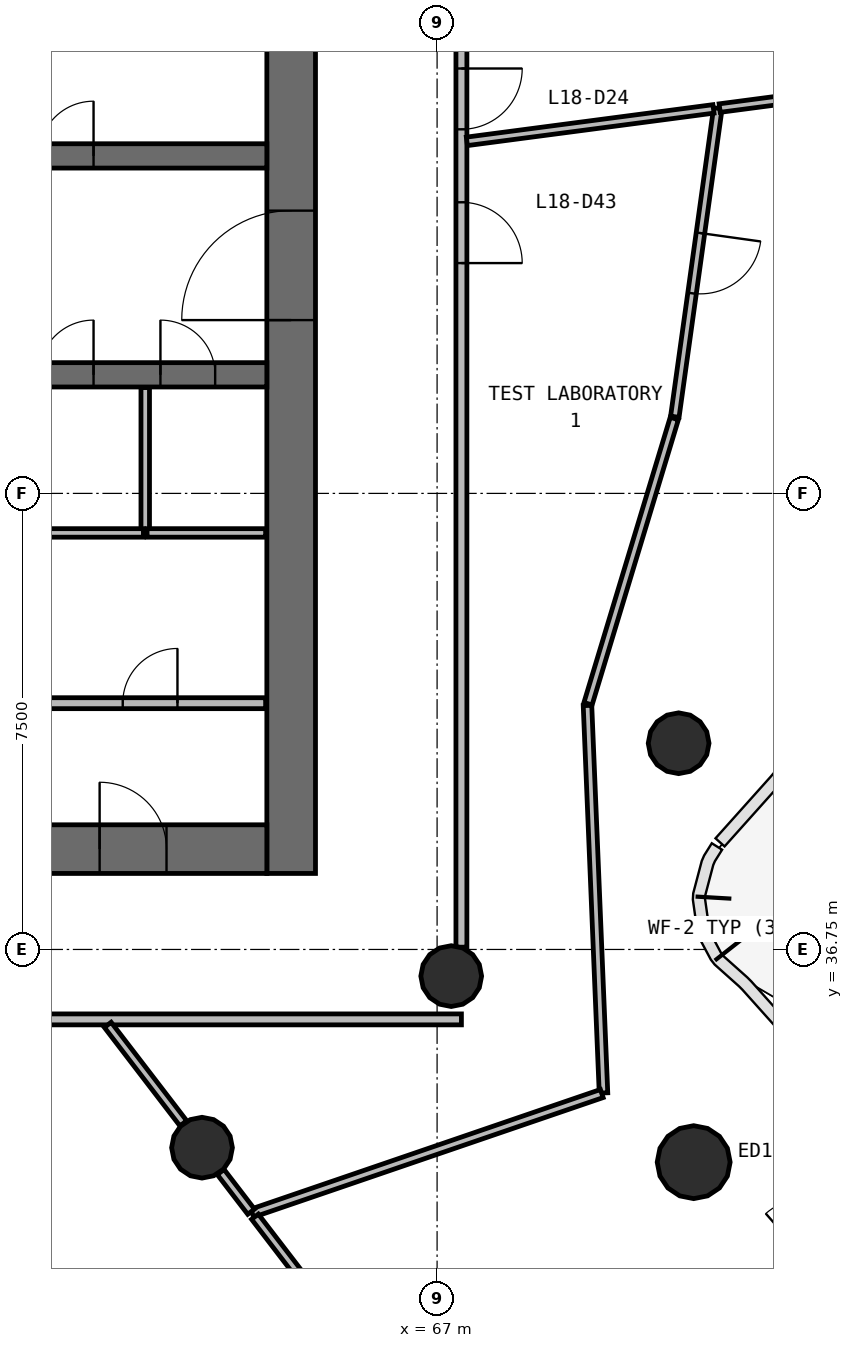
"""IFC4 building model, lengths in metres.
Left out: names, types, materials, properties, quantities, classifications, styles, units other than length and angle.
Written with IfcOpenShell. Run it as: python <this file> out.ifc"""

import sys

from ifc_helpers import new_model, si_unit, direction, frame, frame_2d, origin, origin_2d, place, context, subcontext, project, spatial, rectangle, circle, extrude, source, transform, mapped, element, fill, save


model = new_model("IFC4")
c1 = context("Model", 3, precision=1e-05, world=origin(), true_north=direction((0.0, 1.0)))
c2 = subcontext(c1, "Body", "Model", "MODEL_VIEW")
j1 = project(units=[si_unit("LENGTHUNIT", "METRE"), si_unit("PLANEANGLEUNIT", "RADIAN")], contexts=[c1])
p1 = place(None, origin())
s1 = spatial("IfcSite", under=j1, at=p1, CompositionType="ELEMENT")
p2 = place(p1, origin())
s2 = spatial("IfcBuilding", under=s1, at=p2, CompositionType="ELEMENT")
p3 = place(p2, frame((0.0, 0.0, 79.8)))
s3 = spatial("IfcBuildingStorey", under=s2, at=p3, CompositionType="ELEMENT", Elevation=79.8)
p4 = place(p3, frame((64.6, 38.0, 0.0), z_axis=(0.0, 0.0, 1.0), x_axis=(0.0, 1.0, 0.0)))
e1 = element("IfcWall", 1, at=p4, inside=s3, PredefinedType="SHEAR", context=c2, shape_type="SweptSolid", body=[
    extrude(rectangle(XDim=20.0, YDim=0.8, at=frame_2d((10.0, 0.0))), origin(), (0.0, 0.0, 1.0), 4.1),
])
p5 = place(p4, frame((9.1, 0.0, 0.0)))
e2 = element("IfcOpeningElement", 2, at=p5, cuts=e1, PredefinedType="OPENING", context=c2, shape_type="SweptSolid", body=[
    extrude(rectangle(XDim=1.8, YDim=2.1, at=frame_2d((0.9, 1.05))), frame((0.0, 0.41, 0.0), z_axis=(0.0, -1.0, 0.0), x_axis=(1.0, 0.0, 0.0)), (0.0, 0.0, 1.0), 0.82),
])
p6 = place(p3, frame((39.8, 38.4, 0.0), z_axis=(0.0, 0.0, 1.0), x_axis=(1.0, 0.0, 0.0)))
e3 = element("IfcWall", 3, at=p6, inside=s3, PredefinedType="SHEAR", context=c2, shape_type="SweptSolid", body=[
    extrude(rectangle(XDim=24.4, YDim=0.8, at=frame_2d((12.2, 0.0))), origin(), (0.0, 0.0, 1.0), 4.1),
])
p7 = place(p6, frame((21.65, 0.0, 0.0)))
e4 = element("IfcOpeningElement", 4, at=p7, cuts=e3, PredefinedType="OPENING", context=c2, shape_type="SweptSolid", body=[
    extrude(rectangle(XDim=1.1, YDim=2.1, at=frame_2d((0.55, 1.05))), frame((0.0, 0.41, 0.0), z_axis=(0.0, -1.0, 0.0), x_axis=(1.0, 0.0, 0.0)), (0.0, 0.0, 1.0), 0.82),
])
p8 = place(p6, frame((2.15, 0.0, 0.0)))
e5 = element("IfcOpeningElement", 5, at=p8, cuts=e3, PredefinedType="OPENING", context=c2, shape_type="SweptSolid", body=[
    extrude(rectangle(XDim=1.1, YDim=2.1, at=frame_2d((0.55, 1.05))), frame((0.0, 0.41, 0.0), z_axis=(0.0, -1.0, 0.0), x_axis=(1.0, 0.0, 0.0)), (0.0, 0.0, 1.0), 0.82),
])
p9 = place(p3, frame((39.8, 49.8, 0.0), z_axis=(0.0, 0.0, 1.0), x_axis=(1.0, 0.0, 0.0)))
e6 = element("IfcWall", 6, at=p9, inside=s3, PredefinedType="SHEAR", context=c2, shape_type="SweptSolid", body=[
    extrude(rectangle(XDim=24.4, YDim=0.4, at=frame_2d((12.2, 0.0))), origin(), (0.0, 0.0, 1.0), 4.1),
])
p10 = place(p9, frame((4.7, 0.0, 0.0)))
e7 = element("IfcOpeningElement", 7, at=p10, cuts=e6, PredefinedType="OPENING", context=c2, shape_type="SweptSolid", body=[
    extrude(rectangle(XDim=1.1, YDim=2.1, at=frame_2d((0.55, 1.05))), frame((0.0, 0.21, 0.0), z_axis=(0.0, -1.0, 0.0), x_axis=(1.0, 0.0, 0.0)), (0.0, 0.0, 1.0), 0.42),
])
p11 = place(p9, frame((7.2, 0.0, 0.0)))
e8 = element("IfcOpeningElement", 8, at=p11, cuts=e6, PredefinedType="OPENING", context=c2, shape_type="SweptSolid", body=[
    extrude(rectangle(XDim=1.1, YDim=2.1, at=frame_2d((0.55, 1.05))), frame((0.0, 0.21, 0.0), z_axis=(0.0, -1.0, 0.0), x_axis=(1.0, 0.0, 0.0)), (0.0, 0.0, 1.0), 0.42),
])
p12 = place(p9, frame((9.7, 0.0, 0.0)))
e9 = element("IfcOpeningElement", 9, at=p12, cuts=e6, PredefinedType="OPENING", context=c2, shape_type="SweptSolid", body=[
    extrude(rectangle(XDim=1.1, YDim=2.1, at=frame_2d((0.55, 1.05))), frame((0.0, 0.21, 0.0), z_axis=(0.0, -1.0, 0.0), x_axis=(1.0, 0.0, 0.0)), (0.0, 0.0, 1.0), 0.42),
])
p13 = place(p9, frame((1.1, 0.0, 0.0)))
e10 = element("IfcOpeningElement", 10, at=p13, cuts=e6, PredefinedType="OPENING", context=c2, shape_type="SweptSolid", body=[
    extrude(rectangle(XDim=1.8, YDim=2.4, at=frame_2d((0.9, 1.2))), frame((0.0, 0.21, 0.0), z_axis=(0.0, -1.0, 0.0), x_axis=(1.0, 0.0, 0.0)), (0.0, 0.0, 1.0), 0.42),
])
p14 = place(p9, frame((20.65, 0.0, 0.0)))
e11 = element("IfcOpeningElement", 11, at=p14, cuts=e6, PredefinedType="OPENING", context=c2, shape_type="SweptSolid", body=[
    extrude(rectangle(XDim=0.9, YDim=2.1, at=frame_2d((0.45, 1.05))), frame((0.0, 0.21, 0.0), z_axis=(0.0, -1.0, 0.0), x_axis=(1.0, 0.0, 0.0)), (0.0, 0.0, 1.0), 0.42),
])
p15 = place(p9, frame((11.85, 0.0, 0.0)))
e12 = element("IfcOpeningElement", 12, at=p15, cuts=e6, PredefinedType="OPENING", context=c2, shape_type="SweptSolid", body=[
    extrude(rectangle(XDim=0.9, YDim=2.1, at=frame_2d((0.45, 1.05))), frame((0.0, 0.21, 0.0), z_axis=(0.0, -1.0, 0.0), x_axis=(1.0, 0.0, 0.0)), (0.0, 0.0, 1.0), 0.42),
])
p16 = place(p3, frame((39.8, 46.2, 0.0), z_axis=(0.0, 0.0, 1.0), x_axis=(1.0, 0.0, 0.0)))
e13 = element("IfcWall", 13, at=p16, inside=s3, PredefinedType="SHEAR", context=c2, shape_type="SweptSolid", body=[
    extrude(rectangle(XDim=24.4, YDim=0.4, at=frame_2d((12.2, 0.0))), origin(), (0.0, 0.0, 1.0), 4.1),
])
p17 = place(p16, frame((4.7, 0.0, 0.0)))
e14 = element("IfcOpeningElement", 14, at=p17, cuts=e13, PredefinedType="OPENING", context=c2, shape_type="SweptSolid", body=[
    extrude(rectangle(XDim=1.1, YDim=2.1, at=frame_2d((0.55, 1.05))), frame((0.0, 0.21, 0.0), z_axis=(0.0, -1.0, 0.0), x_axis=(1.0, 0.0, 0.0)), (0.0, 0.0, 1.0), 0.42),
])
p18 = place(p16, frame((7.2, 0.0, 0.0)))
e15 = element("IfcOpeningElement", 15, at=p18, cuts=e13, PredefinedType="OPENING", context=c2, shape_type="SweptSolid", body=[
    extrude(rectangle(XDim=1.1, YDim=2.1, at=frame_2d((0.55, 1.05))), frame((0.0, 0.21, 0.0), z_axis=(0.0, -1.0, 0.0), x_axis=(1.0, 0.0, 0.0)), (0.0, 0.0, 1.0), 0.42),
])
p19 = place(p16, frame((9.7, 0.0, 0.0)))
e16 = element("IfcOpeningElement", 16, at=p19, cuts=e13, PredefinedType="OPENING", context=c2, shape_type="SweptSolid", body=[
    extrude(rectangle(XDim=1.1, YDim=2.1, at=frame_2d((0.55, 1.05))), frame((0.0, 0.21, 0.0), z_axis=(0.0, -1.0, 0.0), x_axis=(1.0, 0.0, 0.0)), (0.0, 0.0, 1.0), 0.42),
])
p20 = place(p16, frame((20.65, 0.0, 0.0)))
e17 = element("IfcOpeningElement", 17, at=p20, cuts=e13, PredefinedType="OPENING", context=c2, shape_type="SweptSolid", body=[
    extrude(rectangle(XDim=0.9, YDim=2.1, at=frame_2d((0.45, 1.05))), frame((0.0, 0.21, 0.0), z_axis=(0.0, -1.0, 0.0), x_axis=(1.0, 0.0, 0.0)), (0.0, 0.0, 1.0), 0.42),
])
p21 = place(p16, frame((22.65, 0.0, 0.0)))
e18 = element("IfcOpeningElement", 18, at=p21, cuts=e13, PredefinedType="OPENING", context=c2, shape_type="SweptSolid", body=[
    extrude(rectangle(XDim=0.9, YDim=2.1, at=frame_2d((0.45, 1.05))), frame((0.0, 0.21, 0.0), z_axis=(0.0, -1.0, 0.0), x_axis=(1.0, 0.0, 0.0)), (0.0, 0.0, 1.0), 0.42),
])
p22 = place(p16, frame((0.85, 0.0, 0.0)))
e19 = element("IfcOpeningElement", 19, at=p22, cuts=e13, PredefinedType="OPENING", context=c2, shape_type="SweptSolid", body=[
    extrude(rectangle(XDim=0.9, YDim=2.1, at=frame_2d((0.45, 1.05))), frame((0.0, 0.21, 0.0), z_axis=(0.0, -1.0, 0.0), x_axis=(1.0, 0.0, 0.0)), (0.0, 0.0, 1.0), 0.42),
])
p23 = place(p16, frame((2.85, 0.0, 0.0)))
e20 = element("IfcOpeningElement", 20, at=p23, cuts=e13, PredefinedType="OPENING", context=c2, shape_type="SweptSolid", body=[
    extrude(rectangle(XDim=0.9, YDim=2.1, at=frame_2d((0.45, 1.05))), frame((0.0, 0.21, 0.0), z_axis=(0.0, -1.0, 0.0), x_axis=(1.0, 0.0, 0.0)), (0.0, 0.0, 1.0), 0.42),
])
p24 = place(p16, frame((11.85, 0.0, 0.0)))
e21 = element("IfcOpeningElement", 21, at=p24, cuts=e13, PredefinedType="OPENING", context=c2, shape_type="SweptSolid", body=[
    extrude(rectangle(XDim=0.9, YDim=2.1, at=frame_2d((0.45, 1.05))), frame((0.0, 0.21, 0.0), z_axis=(0.0, -1.0, 0.0), x_axis=(1.0, 0.0, 0.0)), (0.0, 0.0, 1.0), 0.42),
])
m1 = source(origin(), c2, "Body", "SweptSolid", [
    extrude(circle(Radius=0.6, at=origin_2d()), origin(), (0.0, 0.0, 1.0), 4.5),
])
p25 = place(p3, frame((71.22, 33.252, -0.4), z_axis=(0.0, 0.0, 1.0), x_axis=(1.0, 0.0, 0.0)))
e22 = element("IfcColumn", 22, at=p25, inside=s3, PredefinedType="COLUMN", context=c2, shape_type="MappedRepresentation", body=[
    mapped(m1, transform((0.0, 0.0, 0.0), scale=1.0)),
])
m2 = source(origin(), c2, "Body", "SweptSolid", [
    extrude(circle(Radius=0.5, at=origin_2d()), origin(), (0.0, 0.0, 1.0), 4.1),
])
for number, where, z_axis, x_axis in (
    (23, (63.134, 33.49, 0.0), (0.0, 0.0, 1.0), (1.0, 0.0, 0.0)),
    (24, (67.232, 36.312, 0.0), (0.0, 0.0, 1.0), (1.0, 0.0, 0.0)),
    (25, (70.972, 40.141, 0.0), (0.0, 0.0, 1.0), (1.0, 0.0, 0.0)),
):
    element("IfcColumn", number, at=place(p3, frame(where, z_axis=z_axis, x_axis=x_axis)), inside=s3, PredefinedType="COLUMN", context=c2, shape_type="MappedRepresentation", body=[
        mapped(m2, transform((0.0, 0.0, 0.0), scale=1.0)),
    ])
p26 = place(p3, frame((72.124, 30.835, 0.0), z_axis=(0.0, 0.0, 1.0), x_axis=(0.753580850098, 0.65735523301, 0.0)))
e26 = element("IfcWall", 26, at=p26, inside=s3, PredefinedType="STANDARD", context=c2, shape_type="SweptSolid", body=[
    extrude(rectangle(XDim=3.491, YDim=0.18, at=frame_2d((1.746, 0.0))), origin(), (0.0, 0.0, 1.0), 3.7),
])
p27 = place(p26, frame((1.246, 0.0, 0.0)))
e27 = element("IfcOpeningElement", 27, at=p27, cuts=e26, PredefinedType="OPENING", context=c2, shape_type="SweptSolid", body=[
    extrude(rectangle(XDim=1.0, YDim=2.1, at=frame_2d((0.5, 1.05))), frame((0.0, 0.1, 0.0), z_axis=(0.0, -1.0, 0.0), x_axis=(1.0, 0.0, 0.0)), (0.0, 0.0, 1.0), 0.2),
])
p28 = place(p3, frame((67.4, 35.6, 0.0), z_axis=(0.0, 0.0, 1.0), x_axis=(-1.0, 0.0, 0.0)))
e28 = element("IfcWall", 28, at=p28, inside=s3, PredefinedType="PARTITIONING", context=c2, shape_type="SweptSolid", body=[
    extrude(rectangle(XDim=30.8, YDim=0.18, at=frame_2d((15.4, 0.0))), origin(), (0.0, 0.0, 1.0), 2.9),
])
p29 = place(p28, frame((17.35, 0.0, 0.0)))
e29 = element("IfcOpeningElement", 29, at=p29, cuts=e28, PredefinedType="OPENING", context=c2, shape_type="SweptSolid", body=[
    extrude(rectangle(XDim=1.0, YDim=2.1, at=frame_2d((0.5, 1.05))), frame((0.0, 0.1, 0.0), z_axis=(0.0, -1.0, 0.0), x_axis=(1.0, 0.0, 0.0)), (0.0, 0.0, 1.0), 0.2),
])
p30 = place(p28, frame((14.95, 0.0, 0.0)))
e30 = element("IfcOpeningElement", 30, at=p30, cuts=e28, PredefinedType="OPENING", context=c2, shape_type="SweptSolid", body=[
    extrude(rectangle(XDim=1.0, YDim=2.1, at=frame_2d((0.5, 1.05))), frame((0.0, 0.1, 0.0), z_axis=(0.0, -1.0, 0.0), x_axis=(1.0, 0.0, 0.0)), (0.0, 0.0, 1.0), 0.2),
])
p31 = place(p3, frame((67.4, 60.37, 0.0), z_axis=(0.0, 0.0, 1.0), x_axis=(0.0, -1.0, 0.0)))
e31 = element("IfcWall", 31, at=p31, inside=s3, PredefinedType="PARTITIONING", context=c2, shape_type="SweptSolid", body=[
    extrude(rectangle(XDim=23.583, YDim=0.18, at=frame_2d((11.791, 0.0))), origin(), (0.0, 0.0, 1.0), 2.9),
])
p32 = place(p31, frame((9.133, 0.0, 0.0)))
e32 = element("IfcOpeningElement", 32, at=p32, cuts=e31, PredefinedType="OPENING", context=c2, shape_type="SweptSolid", body=[
    extrude(rectangle(XDim=1.0, YDim=2.1, at=frame_2d((0.5, 1.05))), frame((0.0, 0.1, 0.0), z_axis=(0.0, -1.0, 0.0), x_axis=(1.0, 0.0, 0.0)), (0.0, 0.0, 1.0), 0.2),
])
p33 = place(p31, frame((4.633, 0.0, 0.0)))
e33 = element("IfcOpeningElement", 33, at=p33, cuts=e31, PredefinedType="OPENING", context=c2, shape_type="SweptSolid", body=[
    extrude(rectangle(XDim=0.9, YDim=2.1, at=frame_2d((0.45, 1.05))), frame((0.0, 0.1, 0.0), z_axis=(0.0, -1.0, 0.0), x_axis=(1.0, 0.0, 0.0)), (0.0, 0.0, 1.0), 0.2),
])
p34 = place(p31, frame((1.232, 0.0, 0.0)))
e34 = element("IfcOpeningElement", 34, at=p34, cuts=e31, PredefinedType="OPENING", context=c2, shape_type="SweptSolid", body=[
    extrude(rectangle(XDim=0.9, YDim=2.1, at=frame_2d((0.45, 1.05))), frame((0.0, 0.1, 0.0), z_axis=(0.0, -1.0, 0.0), x_axis=(1.0, 0.0, 0.0)), (0.0, 0.0, 1.0), 0.2),
])
p35 = place(p31, frame((11.333, 0.0, 0.0)))
e35 = element("IfcOpeningElement", 35, at=p35, cuts=e31, PredefinedType="OPENING", context=c2, shape_type="SweptSolid", body=[
    extrude(rectangle(XDim=1.0, YDim=2.1, at=frame_2d((0.5, 1.05))), frame((0.0, 0.1, 0.0), z_axis=(0.0, -1.0, 0.0), x_axis=(1.0, 0.0, 0.0)), (0.0, 0.0, 1.0), 0.2),
])
p36 = place(p3, frame((60.23, 40.8, 0.0), z_axis=(0.0, 0.0, 1.0), x_axis=(1.0, 0.0, 0.0)))
e36 = element("IfcWall", 36, at=p36, inside=s3, PredefinedType="PARTITIONING", context=c2, shape_type="SweptSolid", body=[
    extrude(rectangle(XDim=3.95, YDim=0.18, at=frame_2d((1.975, 0.0))), origin(), (0.0, 0.0, 1.0), 3.7),
])
p37 = place(p36, frame((1.6, 0.0, 0.0)))
e37 = element("IfcOpeningElement", 37, at=p37, cuts=e36, PredefinedType="OPENING", context=c2, shape_type="SweptSolid", body=[
    extrude(rectangle(XDim=0.9, YDim=2.1, at=frame_2d((0.45, 1.05))), frame((0.0, 0.1, 0.0), z_axis=(0.0, -1.0, 0.0), x_axis=(1.0, 0.0, 0.0)), (0.0, 0.0, 1.0), 0.2),
])
p38 = place(p3, frame((69.737, 34.39, 0.0), z_axis=(0.0, 0.0, 1.0), x_axis=(-0.041305713894, 0.999146554815, 0.0)))
e38 = element("IfcWall", 38, at=p38, inside=s3, PredefinedType="PARTITIONING", context=c2, shape_type="SweptSolid", body=[
    extrude(rectangle(XDim=6.377, YDim=0.14, at=frame_2d((3.189, 0.0))), origin(), (0.0, 0.0, 1.0), 2.9),
])
p39 = place(p3, frame((63.96, 32.414, 0.0), z_axis=(0.0, 0.0, 1.0), x_axis=(0.946170785579, 0.323667799628, 0.0)))
e39 = element("IfcWall", 39, at=p39, inside=s3, PredefinedType="PARTITIONING", context=c2, shape_type="SweptSolid", body=[
    extrude(rectangle(XDim=6.076, YDim=0.14, at=frame_2d((3.038, 0.0))), origin(), (0.0, 0.0, 1.0), 2.9),
])
p40 = place(p3, frame((71.617, 50.583, 0.0), z_axis=(0.0, 0.0, 1.0), x_axis=(-0.138150358713, -0.990411267296, 0.0)))
e40 = element("IfcWall", 40, at=p40, inside=s3, PredefinedType="PARTITIONING", context=c2, shape_type="SweptSolid", body=[
    extrude(rectangle(XDim=5.121, YDim=0.14, at=frame_2d((2.561, 0.0))), origin(), (0.0, 0.0, 1.0), 2.9),
])
p41 = place(p40, frame((2.071, 0.0, 0.0)))
e41 = element("IfcOpeningElement", 41, at=p41, cuts=e40, PredefinedType="OPENING", context=c2, shape_type="SweptSolid", body=[
    extrude(rectangle(XDim=1.0, YDim=2.1, at=frame_2d((0.5, 1.05))), frame((0.0, 0.08, 0.0), z_axis=(0.0, -1.0, 0.0), x_axis=(1.0, 0.0, 0.0)), (0.0, 0.0, 1.0), 0.16),
])
p42 = place(p3, frame((69.482, 40.791, 0.0), z_axis=(0.0, 0.0, 1.0), x_axis=(0.289545544605, 0.957164237526, 0.0)))
e42 = element("IfcWall", 42, at=p42, inside=s3, PredefinedType="PARTITIONING", context=c2, shape_type="SweptSolid", body=[
    extrude(rectangle(XDim=4.901, YDim=0.14, at=frame_2d((2.45, 0.0))), origin(), (0.0, 0.0, 1.0), 2.9),
])
p43 = place(p3, frame((67.49, 50.039, 0.0), z_axis=(0.0, 0.0, 1.0), x_axis=(0.991443931676, 0.130533253782, 0.0)))
e43 = element("IfcWall", 43, at=p43, inside=s3, PredefinedType="PARTITIONING", context=c2, shape_type="SweptSolid", body=[
    extrude(rectangle(XDim=4.09, YDim=0.14, at=frame_2d((2.045, 0.0))), origin(), (0.0, 0.0, 1.0), 2.9),
])
p44 = place(p3, frame((64.005, 32.355, 0.0), z_axis=(0.0, 0.0, 1.0), x_axis=(0.608803809678, -0.793320818661, 0.0)))
e44 = element("IfcWall", 44, at=p44, inside=s3, PredefinedType="PARTITIONING", context=c2, shape_type="SweptSolid", body=[
    extrude(rectangle(XDim=2.863, YDim=0.14, at=frame_2d((1.432, 0.0))), origin(), (0.0, 0.0, 1.0), 2.9),
])
p45 = place(p3, frame((62.2, 43.6, 0.0), z_axis=(0.0, 0.0, 1.0), x_axis=(0.0, 1.0, 0.0)))
e45 = element("IfcWall", 45, at=p45, inside=s3, PredefinedType="PARTITIONING", context=c2, shape_type="SweptSolid", body=[
    extrude(rectangle(XDim=2.39, YDim=0.14, at=frame_2d((1.195, 0.0))), origin(), (0.0, 0.0, 1.0), 2.9),
])
p46 = place(p3, frame((71.647, 50.587, 0.0), z_axis=(0.0, 0.0, 1.0), x_axis=(0.991446778165, 0.130511631917, 0.0)))
e46 = element("IfcWall", 46, at=p46, inside=s3, PredefinedType="PARTITIONING", context=c2, shape_type="SweptSolid", body=[
    extrude(rectangle(XDim=2.101, YDim=0.14, at=frame_2d((1.05, 0.0))), origin(), (0.0, 0.0, 1.0), 2.9),
])
p47 = place(p3, frame((61.584, 35.51, 0.0), z_axis=(0.0, 0.0, 1.0), x_axis=(0.608727763541, -0.793379171578, 0.0)))
e47 = element("IfcWall", 47, at=p47, inside=s3, PredefinedType="PARTITIONING", context=c2, shape_type="SweptSolid", body=[
    extrude(rectangle(XDim=2.042, YDim=0.14, at=frame_2d((1.021, 0.0))), origin(), (0.0, 0.0, 1.0), 2.9),
])
p48 = place(p3, frame((60.23, 43.6, 0.0), z_axis=(0.0, 0.0, 1.0), x_axis=(1.0, 0.0, 0.0)))
e48 = element("IfcWall", 48, at=p48, inside=s3, PredefinedType="PARTITIONING", context=c2, shape_type="SweptSolid", body=[
    extrude(rectangle(XDim=1.94, YDim=0.14, at=frame_2d((0.97, 0.0))), origin(), (0.0, 0.0, 1.0), 2.9),
])
p49 = place(p3, frame((62.23, 43.6, 0.0), z_axis=(0.0, 0.0, 1.0), x_axis=(1.0, 0.0, 0.0)))
e49 = element("IfcWall", 49, at=p49, inside=s3, PredefinedType="PARTITIONING", context=c2, shape_type="SweptSolid", body=[
    extrude(rectangle(XDim=1.95, YDim=0.14, at=frame_2d((0.975, 0.0))), origin(), (0.0, 0.0, 1.0), 2.9),
])
p50 = place(p3, frame((63.441, 33.09, 0.0), z_axis=(0.0, 0.0, 1.0), x_axis=(0.608705788034, -0.793396032013, 0.0)))
e50 = element("IfcWall", 50, at=p50, inside=s3, PredefinedType="PARTITIONING", context=c2, shape_type="SweptSolid", body=[
    extrude(rectangle(XDim=0.822, YDim=0.14, at=frame_2d((0.411, 0.0))), origin(), (0.0, 0.0, 1.0), 2.9),
])
m3 = source(origin(), c2, "Body", "SweptSolid", [
    extrude(rectangle(XDim=1.8, YDim=2.1, at=frame_2d((0.9, 1.05))), frame((0.0, 0.025, 0.0), z_axis=(0.0, -1.0, 0.0), x_axis=(1.0, 0.0, 0.0)), (0.0, 0.0, 1.0), 0.05),
])
p51 = place(p5, origin())
e51 = element("IfcDoor", 51, at=p51, inside=s3, OperationType="SINGLE_SWING_LEFT", PredefinedType="DOOR", context=c2, shape_type="MappedRepresentation", body=[
    mapped(m3, transform((0.0, 0.0, 0.0), scale=1.0)),
])
fill(e2, e51)
m4 = source(origin(), c2, "Body", "SweptSolid", [
    extrude(rectangle(XDim=1.1, YDim=2.1, at=frame_2d((0.55, 1.05))), frame((0.0, 0.025, 0.0), z_axis=(0.0, -1.0, 0.0), x_axis=(1.0, 0.0, 0.0)), (0.0, 0.0, 1.0), 0.05),
])
p52 = place(p7, origin())
e52 = element("IfcDoor", 52, at=p52, inside=s3, OperationType="SINGLE_SWING_LEFT", PredefinedType="DOOR", context=c2, shape_type="MappedRepresentation", body=[
    mapped(m4, transform((0.0, 0.0, 0.0), scale=1.0)),
])
fill(e4, e52)
m5 = source(origin(), c2, "Body", "SweptSolid", [
    extrude(rectangle(XDim=1.0, YDim=2.1, at=frame_2d((0.5, 1.05))), frame((0.0, 0.025, 0.0), z_axis=(0.0, -1.0, 0.0), x_axis=(1.0, 0.0, 0.0)), (0.0, 0.0, 1.0), 0.05),
])
p53 = place(p32, origin())
e53 = element("IfcDoor", 53, at=p53, inside=s3, OperationType="SINGLE_SWING_LEFT", PredefinedType="DOOR", context=c2, shape_type="MappedRepresentation", body=[
    mapped(m5, transform((0.0, 0.0, 0.0), scale=1.0)),
])
fill(e32, e53)
p54 = place(p35, origin())
e54 = element("IfcDoor", 54, at=p54, inside=s3, OperationType="SINGLE_SWING_RIGHT", PredefinedType="DOOR", context=c2, shape_type="MappedRepresentation", body=[
    mapped(m5, transform((0.0, 0.0, 0.0), scale=1.0)),
])
fill(e35, e54)
p55 = place(p41, origin())
e55 = element("IfcDoor", 55, at=p55, inside=s3, OperationType="SINGLE_SWING_LEFT", PredefinedType="DOOR", context=c2, shape_type="MappedRepresentation", body=[
    mapped(m5, transform((0.0, 0.0, 0.0), scale=1.0)),
])
fill(e41, e55)
m6 = source(origin(), c2, "Body", "SweptSolid", [
    extrude(rectangle(XDim=0.9, YDim=2.1, at=frame_2d((0.45, 1.05))), frame((0.0, 0.025, 0.0), z_axis=(0.0, -1.0, 0.0), x_axis=(1.0, 0.0, 0.0)), (0.0, 0.0, 1.0), 0.05),
])
p56 = place(p20, origin())
e56 = element("IfcDoor", 56, at=p56, inside=s3, OperationType="SINGLE_SWING_RIGHT", PredefinedType="DOOR", context=c2, shape_type="MappedRepresentation", body=[
    mapped(m6, transform((0.0, 0.0, 0.0), scale=1.0)),
])
fill(e17, e56)
p57 = place(p21, origin())
e57 = element("IfcDoor", 57, at=p57, inside=s3, OperationType="SINGLE_SWING_LEFT", PredefinedType="DOOR", context=c2, shape_type="MappedRepresentation", body=[
    mapped(m6, transform((0.0, 0.0, 0.0), scale=1.0)),
])
fill(e18, e57)
p58 = place(p14, origin())
e58 = element("IfcDoor", 58, at=p58, inside=s3, OperationType="SINGLE_SWING_RIGHT", PredefinedType="DOOR", context=c2, shape_type="MappedRepresentation", body=[
    mapped(m6, transform((0.0, 0.0, 0.0), scale=1.0)),
])
fill(e11, e58)
p59 = place(p37, origin())
e59 = element("IfcDoor", 59, at=p59, inside=s3, OperationType="SINGLE_SWING_RIGHT", PredefinedType="DOOR", context=c2, shape_type="MappedRepresentation", body=[
    mapped(m6, transform((0.0, 0.0, 0.0), scale=1.0)),
])
fill(e37, e59)
save(model, sys.argv[1])
